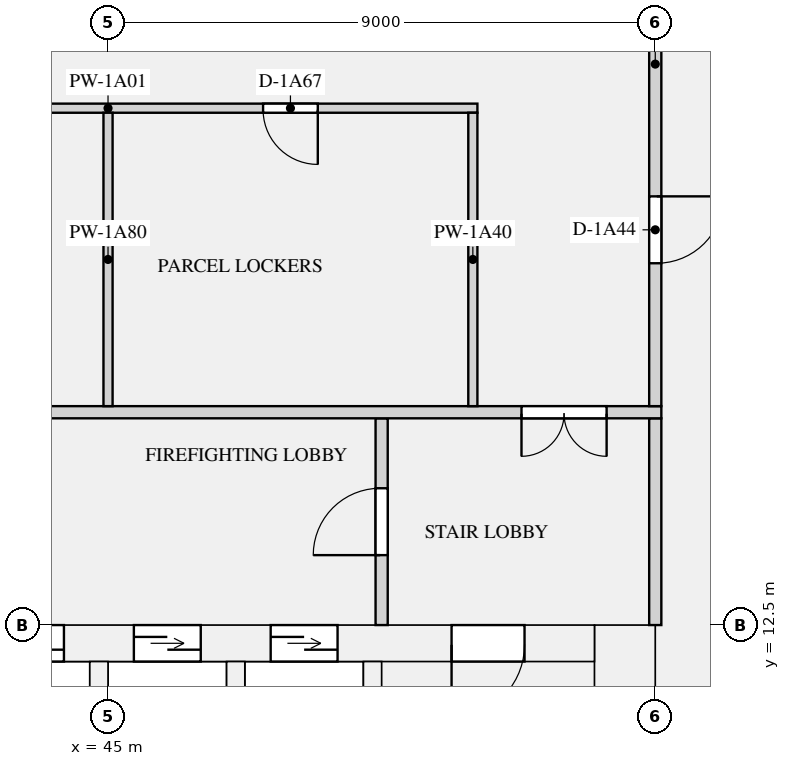
"""IFC4 building model, lengths in metres.
Left out: names, types, materials, properties, quantities, classifications, styles, units other than length and angle.
Written with IfcOpenShell. Run it as: python <this file> out.ifc"""

import sys

from ifc_helpers import new_model, si_unit, direction, frame, frame_2d, origin, place, context, subcontext, project, spatial, rectangle, extrude, element, fill, save


model = new_model("IFC4")
c1 = context("Model", 3, precision=1e-05, world=origin(), true_north=direction((0.0, 1.0)))
c2 = subcontext(c1, "Body", "Model", "MODEL_VIEW")
j1 = project(units=[si_unit("LENGTHUNIT", "METRE"), si_unit("PLANEANGLEUNIT", "RADIAN")], contexts=[c1])
p1 = place(None, origin())
s1 = spatial("IfcSite", under=j1, at=p1, CompositionType="ELEMENT")
p2 = place(p1, origin())
s2 = spatial("IfcBuilding", under=s1, at=p2, CompositionType="ELEMENT")
p3 = place(p2, frame((0.0, 0.0, 19.5)))
s3 = spatial("IfcBuildingStorey", under=s2, at=p3, CompositionType="ELEMENT", Elevation=19.5)
p4 = place(p3, frame((53.5, 0.0, 0.0), z_axis=(0.0, 0.0, 1.0), x_axis=(0.0, 1.0, 0.0)))
e1 = element("IfcWall", 1, at=p4, inside=s3, PredefinedType="SHEAR", context=c2, shape_type="SweptSolid", body=[
    extrude(rectangle(XDim=12.5, YDim=1.0, at=frame_2d((6.25, 0.0))), origin(), (0.0, 0.0, 1.0), 3.15),
])
p5 = place(p3, frame((19.0, 12.2, 0.0), z_axis=(0.0, 0.0, 1.0), x_axis=(1.0, 0.0, 0.0)))
e2 = element("IfcWall", 2, at=p5, inside=s3, PredefinedType="SHEAR", context=c2, shape_type="SweptSolid", body=[
    extrude(rectangle(XDim=34.0, YDim=0.6, at=frame_2d((17.0, 0.0))), origin(), (0.0, 0.0, 1.0), 3.15),
])
p6 = place(p5, frame((4.475, 0.0, 0.0)))
e3 = element("IfcOpeningElement", 3, at=p6, cuts=e2, PredefinedType="OPENING", context=c2, shape_type="SweptSolid", body=[
    extrude(rectangle(XDim=1.2, YDim=2.1, at=frame_2d((0.6, 1.05))), frame((0.0, 0.31, 0.0), z_axis=(0.0, -1.0, 0.0), x_axis=(1.0, 0.0, 0.0)), (0.0, 0.0, 1.0), 0.62),
])
p7 = place(p5, frame((7.325, 0.0, 0.0)))
e4 = element("IfcOpeningElement", 4, at=p7, cuts=e2, PredefinedType="OPENING", context=c2, shape_type="SweptSolid", body=[
    extrude(rectangle(XDim=1.2, YDim=2.1, at=frame_2d((0.6, 1.05))), frame((0.0, 0.31, 0.0), z_axis=(0.0, -1.0, 0.0), x_axis=(1.0, 0.0, 0.0)), (0.0, 0.0, 1.0), 0.62),
])
p8 = place(p5, frame((10.175, 0.0, 0.0)))
e5 = element("IfcOpeningElement", 5, at=p8, cuts=e2, PredefinedType="OPENING", context=c2, shape_type="SweptSolid", body=[
    extrude(rectangle(XDim=1.2, YDim=2.1, at=frame_2d((0.6, 1.05))), frame((0.0, 0.31, 0.0), z_axis=(0.0, -1.0, 0.0), x_axis=(1.0, 0.0, 0.0)), (0.0, 0.0, 1.0), 0.62),
])
p9 = place(p5, frame((13.025, 0.0, 0.0)))
e6 = element("IfcOpeningElement", 6, at=p9, cuts=e2, PredefinedType="OPENING", context=c2, shape_type="SweptSolid", body=[
    extrude(rectangle(XDim=1.2, YDim=2.1, at=frame_2d((0.6, 1.05))), frame((0.0, 0.31, 0.0), z_axis=(0.0, -1.0, 0.0), x_axis=(1.0, 0.0, 0.0)), (0.0, 0.0, 1.0), 0.62),
])
p10 = place(p5, frame((15.875, 0.0, 0.0)))
e7 = element("IfcOpeningElement", 7, at=p10, cuts=e2, PredefinedType="OPENING", context=c2, shape_type="SweptSolid", body=[
    extrude(rectangle(XDim=1.2, YDim=2.1, at=frame_2d((0.6, 1.05))), frame((0.0, 0.31, 0.0), z_axis=(0.0, -1.0, 0.0), x_axis=(1.0, 0.0, 0.0)), (0.0, 0.0, 1.0), 0.62),
])
p11 = place(p5, frame((24.175, 0.0, 0.0)))
e8 = element("IfcOpeningElement", 8, at=p11, cuts=e2, PredefinedType="OPENING", context=c2, shape_type="SweptSolid", body=[
    extrude(rectangle(XDim=1.1, YDim=2.1, at=frame_2d((0.55, 1.05))), frame((0.0, 0.31, 0.0), z_axis=(0.0, -1.0, 0.0), x_axis=(1.0, 0.0, 0.0)), (0.0, 0.0, 1.0), 0.62),
])
p12 = place(p5, frame((26.425, 0.0, 0.0)))
e9 = element("IfcOpeningElement", 9, at=p12, cuts=e2, PredefinedType="OPENING", context=c2, shape_type="SweptSolid", body=[
    extrude(rectangle(XDim=1.1, YDim=2.1, at=frame_2d((0.55, 1.05))), frame((0.0, 0.31, 0.0), z_axis=(0.0, -1.0, 0.0), x_axis=(1.0, 0.0, 0.0)), (0.0, 0.0, 1.0), 0.62),
])
p13 = place(p5, frame((28.675, 0.0, 0.0)))
e10 = element("IfcOpeningElement", 10, at=p13, cuts=e2, PredefinedType="OPENING", context=c2, shape_type="SweptSolid", body=[
    extrude(rectangle(XDim=1.1, YDim=2.1, at=frame_2d((0.55, 1.05))), frame((0.0, 0.31, 0.0), z_axis=(0.0, -1.0, 0.0), x_axis=(1.0, 0.0, 0.0)), (0.0, 0.0, 1.0), 0.62),
])
p14 = place(p5, frame((1.15, 0.0, 0.0)))
e11 = element("IfcOpeningElement", 11, at=p14, cuts=e2, PredefinedType="OPENING", context=c2, shape_type="SweptSolid", body=[
    extrude(rectangle(XDim=1.2, YDim=2.1, at=frame_2d((0.6, 1.05))), frame((0.0, 0.31, 0.0), z_axis=(0.0, -1.0, 0.0), x_axis=(1.0, 0.0, 0.0)), (0.0, 0.0, 1.0), 0.62),
])
p15 = place(p5, frame((31.65, 0.0, 0.0)))
e12 = element("IfcOpeningElement", 12, at=p15, cuts=e2, PredefinedType="OPENING", context=c2, shape_type="SweptSolid", body=[
    extrude(rectangle(XDim=1.2, YDim=2.1, at=frame_2d((0.6, 1.05))), frame((0.0, 0.31, 0.0), z_axis=(0.0, -1.0, 0.0), x_axis=(1.0, 0.0, 0.0)), (0.0, 0.0, 1.0), 0.62),
])
for number, where, z_axis, x_axis in (
    (13, (44.85, 8.25, 0.0), (0.0, 0.0, 1.0), (0.0, 1.0, 0.0)),
    (14, (47.1, 8.25, 0.0), (0.0, 0.0, 1.0), (0.0, 1.0, 0.0)),
    (15, (49.35, 8.25, 0.0), (0.0, 0.0, 1.0), (0.0, 1.0, 0.0)),
):
    element("IfcWall", number, at=place(p3, frame(where, z_axis=z_axis, x_axis=x_axis)), inside=s3, PredefinedType="SHEAR", context=c2, shape_type="SweptSolid", body=[
        extrude(rectangle(XDim=3.65, YDim=0.3, at=frame_2d((1.825, 0.0))), origin(), (0.0, 0.0, 1.0), 3.15),
    ])
p16 = place(p3, frame((49.5, 12.5, 0.0), z_axis=(0.0, 0.0, 1.0), x_axis=(0.0, 1.0, 0.0)))
e16 = element("IfcWall", 16, at=p16, inside=s3, PredefinedType="PARTITIONING", context=c2, shape_type="SweptSolid", body=[
    extrude(rectangle(XDim=3.4, YDim=0.2, at=frame_2d((1.7, 0.0))), origin(), (0.0, 0.0, 1.0), 2.83),
])
p17 = place(p16, frame((1.15, 0.0, 0.0)))
e17 = element("IfcOpeningElement", 17, at=p17, cuts=e16, PredefinedType="OPENING", context=c2, shape_type="SweptSolid", body=[
    extrude(rectangle(XDim=1.1, YDim=2.1, at=frame_2d((0.55, 1.05))), frame((0.0, 0.11, 0.0), z_axis=(0.0, -1.0, 0.0), x_axis=(1.0, 0.0, 0.0)), (0.0, 0.0, 1.0), 0.22),
])
p18 = place(p3, frame((54.0, 12.5, 0.0), z_axis=(0.0, 0.0, 1.0), x_axis=(0.0, 1.0, 0.0)))
e18 = element("IfcWall", 18, at=p18, inside=s3, PredefinedType="PARTITIONING", context=c2, shape_type="SweptSolid", body=[
    extrude(rectangle(XDim=3.4, YDim=0.2, at=frame_2d((1.7, 0.0))), origin(), (0.0, 0.0, 1.0), 2.83),
])
p19 = place(p3, frame((20.925, 21.0, 0.0), z_axis=(0.0, 0.0, 1.0), x_axis=(1.0, 0.0, 0.0)))
e19 = element("IfcWall", 19, at=p19, inside=s3, PredefinedType="PARTITIONING", context=c2, shape_type="SweptSolid", body=[
    extrude(rectangle(XDim=30.15, YDim=0.15, at=frame_2d((15.075, 0.0))), origin(), (0.0, 0.0, 1.0), 2.83),
])
p20 = place(p19, frame((2.625, 0.0, 0.0)))
e20 = element("IfcOpeningElement", 20, at=p20, cuts=e19, PredefinedType="OPENING", context=c2, shape_type="SweptSolid", body=[
    extrude(rectangle(XDim=0.9, YDim=2.1, at=frame_2d((0.45, 1.05))), frame((0.0, 0.085, 0.0), z_axis=(0.0, -1.0, 0.0), x_axis=(1.0, 0.0, 0.0)), (0.0, 0.0, 1.0), 0.17),
])
p21 = place(p19, frame((8.625, 0.0, 0.0)))
e21 = element("IfcOpeningElement", 21, at=p21, cuts=e19, PredefinedType="OPENING", context=c2, shape_type="SweptSolid", body=[
    extrude(rectangle(XDim=0.9, YDim=2.1, at=frame_2d((0.45, 1.05))), frame((0.0, 0.085, 0.0), z_axis=(0.0, -1.0, 0.0), x_axis=(1.0, 0.0, 0.0)), (0.0, 0.0, 1.0), 0.17),
])
p22 = place(p19, frame((14.625, 0.0, 0.0)))
e22 = element("IfcOpeningElement", 22, at=p22, cuts=e19, PredefinedType="OPENING", context=c2, shape_type="SweptSolid", body=[
    extrude(rectangle(XDim=0.9, YDim=2.1, at=frame_2d((0.45, 1.05))), frame((0.0, 0.085, 0.0), z_axis=(0.0, -1.0, 0.0), x_axis=(1.0, 0.0, 0.0)), (0.0, 0.0, 1.0), 0.17),
])
p23 = place(p19, frame((20.625, 0.0, 0.0)))
e23 = element("IfcOpeningElement", 23, at=p23, cuts=e19, PredefinedType="OPENING", context=c2, shape_type="SweptSolid", body=[
    extrude(rectangle(XDim=0.9, YDim=2.1, at=frame_2d((0.45, 1.05))), frame((0.0, 0.085, 0.0), z_axis=(0.0, -1.0, 0.0), x_axis=(1.0, 0.0, 0.0)), (0.0, 0.0, 1.0), 0.17),
])
p24 = place(p19, frame((26.625, 0.0, 0.0)))
e24 = element("IfcOpeningElement", 24, at=p24, cuts=e19, PredefinedType="OPENING", context=c2, shape_type="SweptSolid", body=[
    extrude(rectangle(XDim=0.9, YDim=2.1, at=frame_2d((0.45, 1.05))), frame((0.0, 0.085, 0.0), z_axis=(0.0, -1.0, 0.0), x_axis=(1.0, 0.0, 0.0)), (0.0, 0.0, 1.0), 0.17),
])
p25 = place(p3, frame((17.9, 16.0, 0.0), z_axis=(0.0, 0.0, 1.0), x_axis=(1.0, 0.0, 0.0)))
e25 = element("IfcWall", 25, at=p25, inside=s3, PredefinedType="PARTITIONING", context=c2, shape_type="SweptSolid", body=[
    extrude(rectangle(XDim=36.2, YDim=0.2, at=frame_2d((18.1, 0.0))), origin(), (0.0, 0.0, 1.0), 2.83),
])
p26 = place(p25, frame((0.9, 0.0, 0.0)))
e26 = element("IfcOpeningElement", 26, at=p26, cuts=e25, PredefinedType="OPENING", context=c2, shape_type="SweptSolid", body=[
    extrude(rectangle(XDim=1.4, YDim=2.1, at=frame_2d((0.7, 1.05))), frame((0.0, 0.11, 0.0), z_axis=(0.0, -1.0, 0.0), x_axis=(1.0, 0.0, 0.0)), (0.0, 0.0, 1.0), 0.22),
])
p27 = place(p25, frame((33.9, 0.0, 0.0)))
e27 = element("IfcOpeningElement", 27, at=p27, cuts=e25, PredefinedType="OPENING", context=c2, shape_type="SweptSolid", body=[
    extrude(rectangle(XDim=1.4, YDim=2.1, at=frame_2d((0.7, 1.05))), frame((0.0, 0.11, 0.0), z_axis=(0.0, -1.0, 0.0), x_axis=(1.0, 0.0, 0.0)), (0.0, 0.0, 1.0), 0.22),
])
p28 = place(p3, frame((54.0, 16.1, 0.0), z_axis=(0.0, 0.0, 1.0), x_axis=(0.0, 1.0, 0.0)))
e28 = element("IfcWall", 28, at=p28, inside=s3, PredefinedType="PARTITIONING", context=c2, shape_type="SweptSolid", body=[
    extrude(rectangle(XDim=7.8, YDim=0.2, at=frame_2d((3.9, 0.0))), origin(), (0.0, 0.0, 1.0), 2.83),
])
p29 = place(p28, frame((2.35, 0.0, 0.0)))
e29 = element("IfcOpeningElement", 29, at=p29, cuts=e28, PredefinedType="OPENING", context=c2, shape_type="SweptSolid", body=[
    extrude(rectangle(XDim=1.1, YDim=2.1, at=frame_2d((0.55, 1.05))), frame((0.0, 0.11, 0.0), z_axis=(0.0, -1.0, 0.0), x_axis=(1.0, 0.0, 0.0)), (0.0, 0.0, 1.0), 0.22),
])
for number, where, z_axis, x_axis in (
    (30, (51.0, 16.1, 0.0), (0.0, 0.0, 1.0), (0.0, 1.0, 0.0)),
    (31, (45.0, 16.1, 0.0), (0.0, 0.0, 1.0), (0.0, 1.0, 0.0)),
):
    element("IfcWall", number, at=place(p3, frame(where, z_axis=z_axis, x_axis=x_axis)), inside=s3, PredefinedType="PARTITIONING", context=c2, shape_type="SweptSolid", body=[
        extrude(rectangle(XDim=4.825, YDim=0.15, at=frame_2d((2.413, 0.0))), origin(), (0.0, 0.0, 1.0), 2.83),
    ])
p30 = place(p11, origin())
e32 = element("IfcDoor", 32, at=p30, inside=s3, OperationType="DOUBLE_DOOR_SLIDING", PredefinedType="DOOR", context=c2, shape_type="SweptSolid", body=[
    extrude(rectangle(XDim=1.1, YDim=2.1, at=frame_2d((0.55, 1.05))), frame((0.0, 0.025, 0.0), z_axis=(0.0, -1.0, 0.0), x_axis=(1.0, 0.0, 0.0)), (0.0, 0.0, 1.0), 0.05),
])
fill(e8, e32)
p31 = place(p12, origin())
e33 = element("IfcDoor", 33, at=p31, inside=s3, OperationType="DOUBLE_DOOR_SLIDING", PredefinedType="DOOR", context=c2, shape_type="SweptSolid", body=[
    extrude(rectangle(XDim=1.1, YDim=2.1, at=frame_2d((0.55, 1.05))), frame((0.0, 0.025, 0.0), z_axis=(0.0, -1.0, 0.0), x_axis=(1.0, 0.0, 0.0)), (0.0, 0.0, 1.0), 0.05),
])
fill(e9, e33)
p32 = place(p13, origin())
e34 = element("IfcDoor", 34, at=p32, inside=s3, OperationType="DOUBLE_DOOR_SLIDING", PredefinedType="DOOR", context=c2, shape_type="SweptSolid", body=[
    extrude(rectangle(XDim=1.1, YDim=2.1, at=frame_2d((0.55, 1.05))), frame((0.0, 0.025, 0.0), z_axis=(0.0, -1.0, 0.0), x_axis=(1.0, 0.0, 0.0)), (0.0, 0.0, 1.0), 0.05),
])
fill(e10, e34)
p33 = place(p15, frame((1.2, 0.0, 0.0), z_axis=(0.0, 0.0, 1.0), x_axis=(-1.0, 0.0, 0.0)))
e35 = element("IfcDoor", 35, at=p33, inside=s3, OperationType="SINGLE_SWING_RIGHT", PredefinedType="DOOR", context=c2, shape_type="SweptSolid", body=[
    extrude(rectangle(XDim=1.2, YDim=2.1, at=frame_2d((0.6, 1.05))), frame((0.0, 0.025, 0.0), z_axis=(0.0, -1.0, 0.0), x_axis=(1.0, 0.0, 0.0)), (0.0, 0.0, 1.0), 0.05),
])
fill(e12, e35)
p34 = place(p17, origin())
e36 = element("IfcDoor", 36, at=p34, inside=s3, OperationType="SINGLE_SWING_LEFT", PredefinedType="DOOR", context=c2, shape_type="SweptSolid", body=[
    extrude(rectangle(XDim=1.1, YDim=2.1, at=frame_2d((0.55, 1.05))), frame((0.0, 0.025, 0.0), z_axis=(0.0, -1.0, 0.0), x_axis=(1.0, 0.0, 0.0)), (0.0, 0.0, 1.0), 0.05),
])
fill(e17, e36)
p35 = place(p27, frame((1.4, 0.0, 0.0), z_axis=(0.0, 0.0, 1.0), x_axis=(-1.0, 0.0, 0.0)))
e37 = element("IfcDoor", 37, at=p35, inside=s3, OperationType="DOUBLE_DOOR_SINGLE_SWING", PredefinedType="DOOR", context=c2, shape_type="SweptSolid", body=[
    extrude(rectangle(XDim=1.4, YDim=2.1, at=frame_2d((0.7, 1.05))), frame((0.0, 0.025, 0.0), z_axis=(0.0, -1.0, 0.0), x_axis=(1.0, 0.0, 0.0)), (0.0, 0.0, 1.0), 0.05),
])
fill(e27, e37)
p36 = place(p29, frame((1.1, 0.0, 0.0), z_axis=(0.0, 0.0, 1.0), x_axis=(-1.0, 0.0, 0.0)))
e38 = element("IfcDoor", 38, at=p36, inside=s3, OperationType="SINGLE_SWING_LEFT", PredefinedType="DOOR", context=c2, shape_type="SweptSolid", body=[
    extrude(rectangle(XDim=1.1, YDim=2.1, at=frame_2d((0.55, 1.05))), frame((0.0, 0.025, 0.0), z_axis=(0.0, -1.0, 0.0), x_axis=(1.0, 0.0, 0.0)), (0.0, 0.0, 1.0), 0.05),
])
fill(e29, e38)
p37 = place(p24, frame((0.9, 0.0, 0.0), z_axis=(0.0, 0.0, 1.0), x_axis=(-1.0, 0.0, 0.0)))
e39 = element("IfcDoor", 39, at=p37, inside=s3, OperationType="SINGLE_SWING_LEFT", PredefinedType="DOOR", context=c2, shape_type="SweptSolid", body=[
    extrude(rectangle(XDim=0.9, YDim=2.1, at=frame_2d((0.45, 1.05))), frame((0.0, 0.025, 0.0), z_axis=(0.0, -1.0, 0.0), x_axis=(1.0, 0.0, 0.0)), (0.0, 0.0, 1.0), 0.05),
])
fill(e24, e39)
save(model, sys.argv[1])
